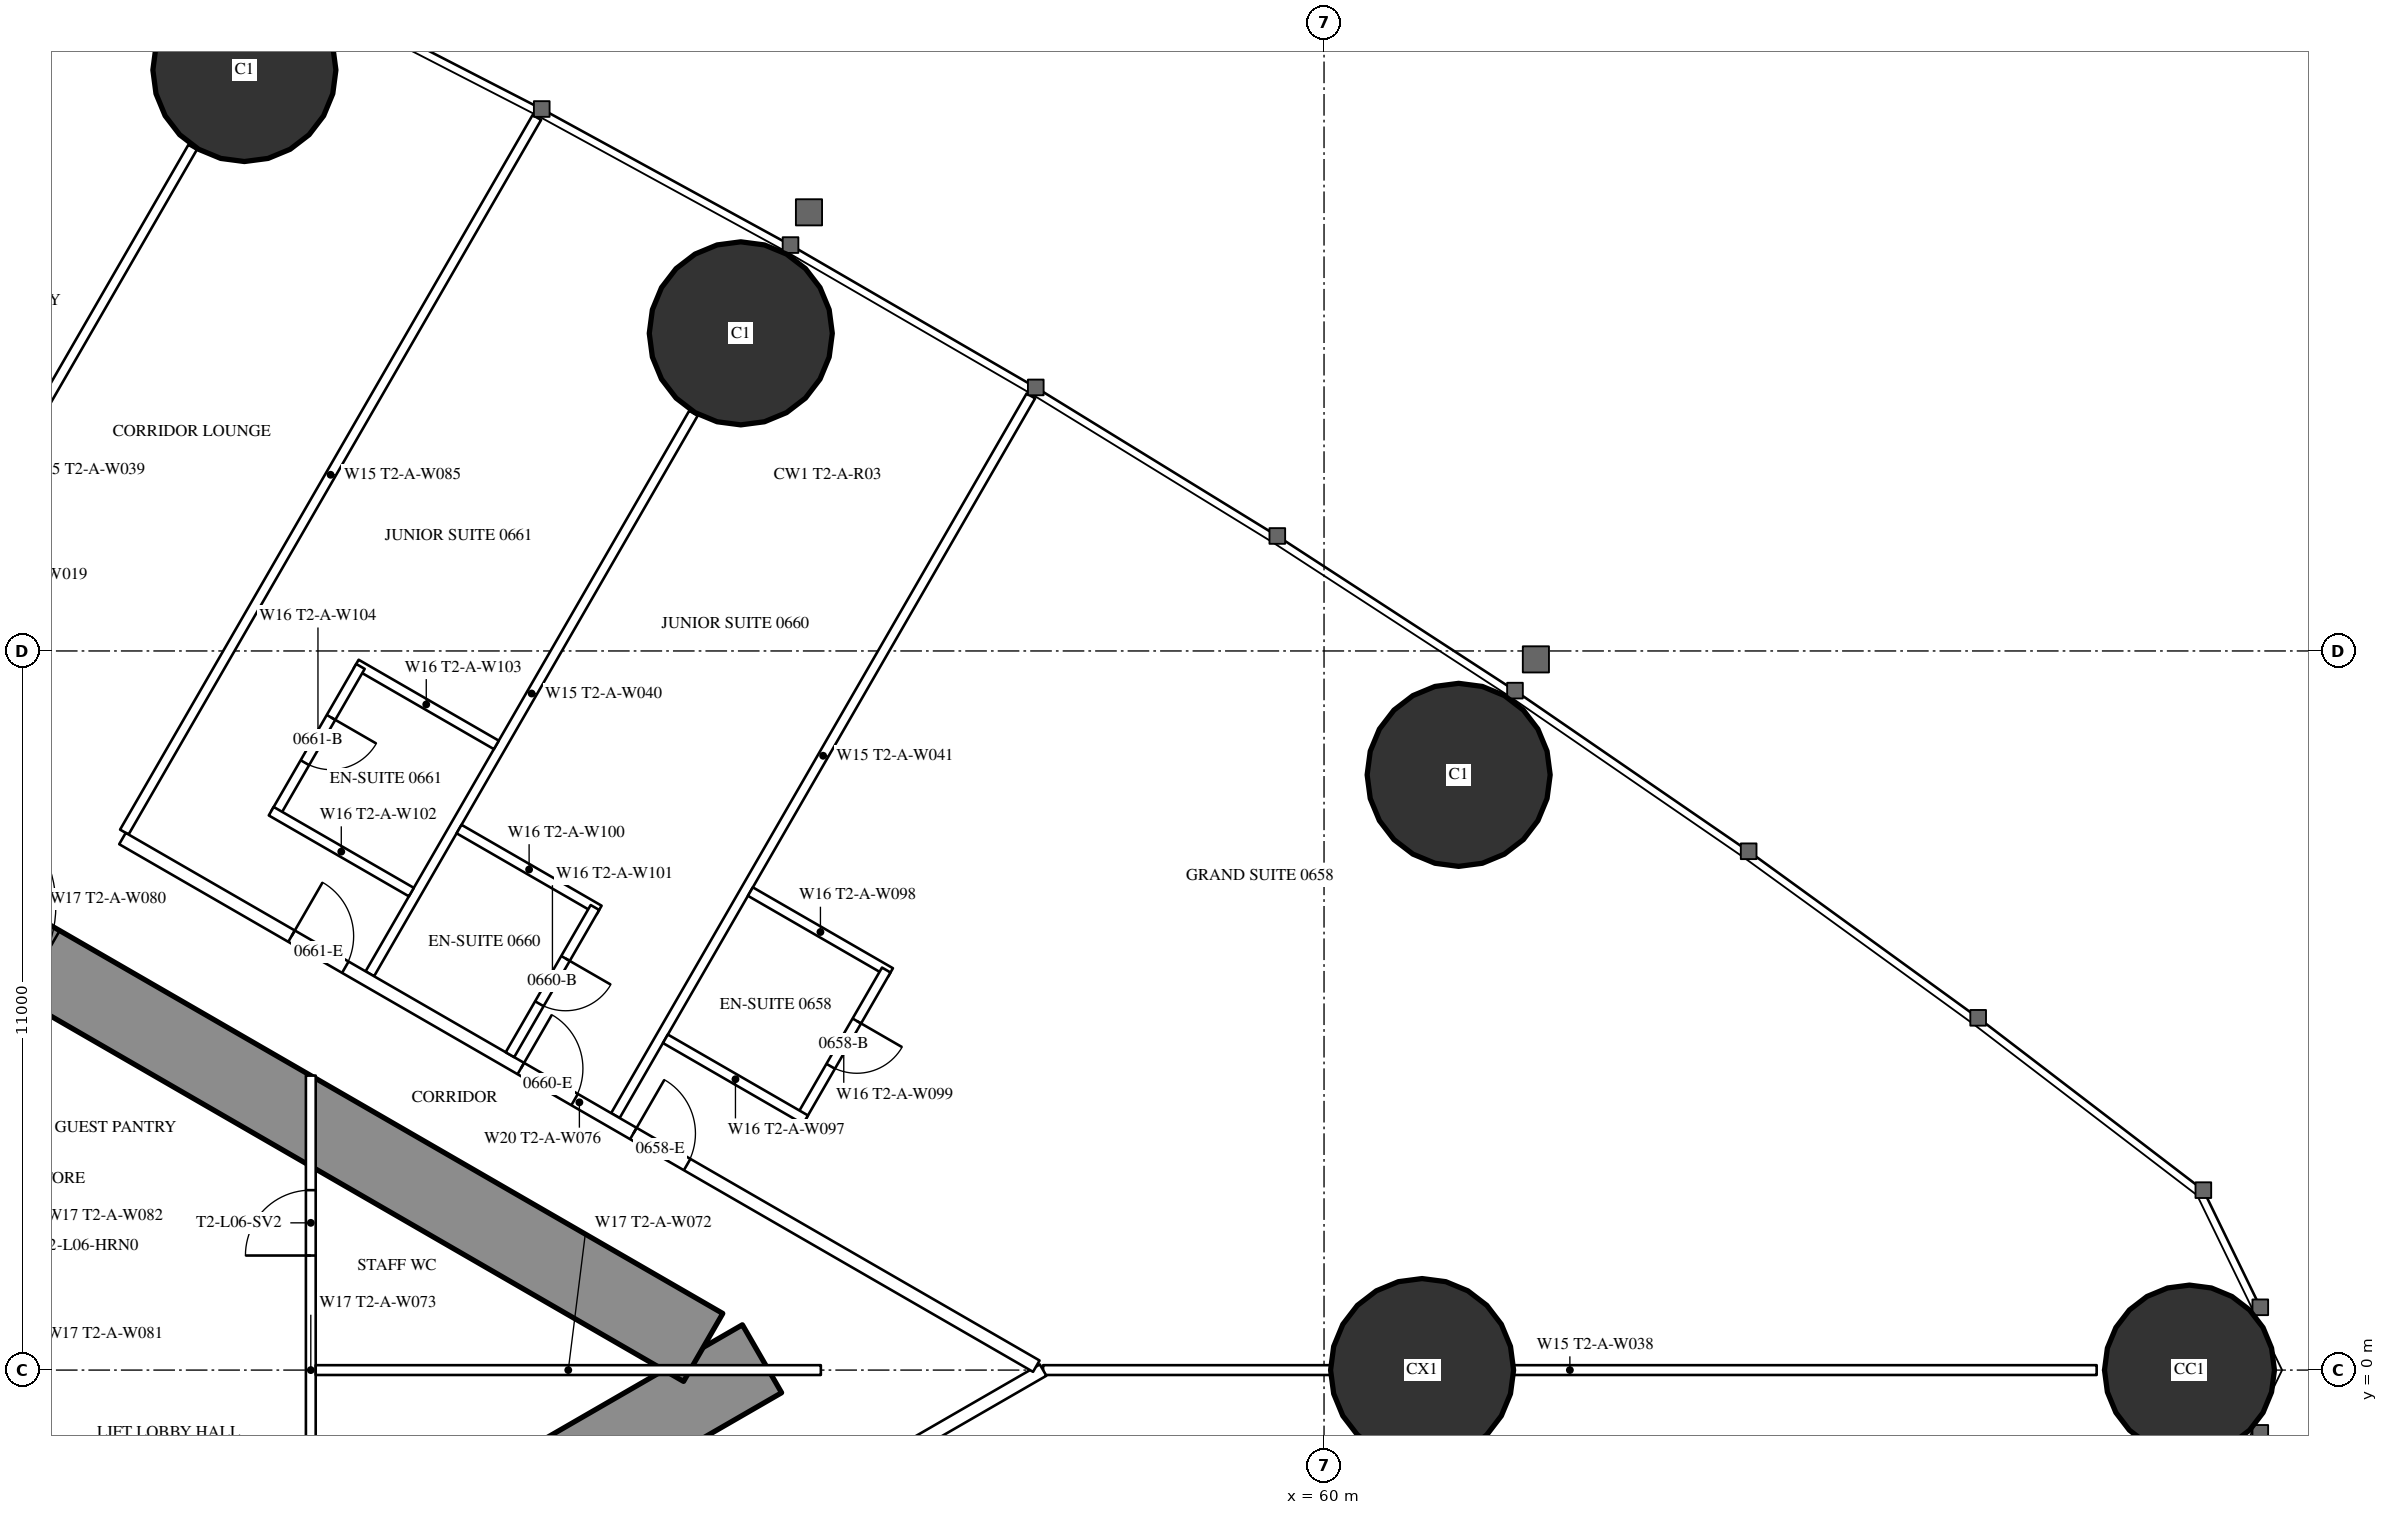
"""IFC4 building model, lengths in metres.
Left out: names, types, materials, properties, quantities, classifications, styles, units other than length and angle.
Written with IfcOpenShell. Run it as: python <this file> out.ifc"""

import sys

from ifc_helpers import new_model, si_unit, direction, frame, frame_2d, origin, origin_2d, place, context, subcontext, project, spatial, rectangle, hollow_circle, extrude, element, fill, save


model = new_model("IFC4")
c1 = context("Model", 3, precision=1e-05, world=origin(), true_north=direction((0.0, 1.0)))
c2 = subcontext(c1, "Body", "Model", "MODEL_VIEW")
j1 = project(units=[si_unit("LENGTHUNIT", "METRE"), si_unit("PLANEANGLEUNIT", "RADIAN")], contexts=[c1])
p1 = place(None, origin())
s1 = spatial("IfcSite", under=j1, at=p1, CompositionType="ELEMENT")
p2 = place(p1, origin())
s2 = spatial("IfcBuilding", under=s1, at=p2, CompositionType="ELEMENT")
p3 = place(p2, frame((0.0, 0.0, 28.5)))
s3 = spatial("IfcBuildingStorey", under=s2, at=p3, CompositionType="ELEMENT", Elevation=28.5)
p4 = place(p3, frame((73.239, 0.0, 0.0), z_axis=(0.0, 0.0, 1.0), x_axis=(1.0, 0.0, 0.0)))
e1 = element("IfcColumn", 1, at=p4, inside=s3, PredefinedType="COLUMN", context=c2, shape_type="SweptSolid", body=[
    extrude(hollow_circle(Radius=1.3, WallThickness=0.1, at=origin_2d()), origin(), (0.0, 0.0, 1.0), 3.5),
])
for number, where, z_axis, x_axis in (
    (2, (62.059, 9.105, 0.0), (0.0, 0.0, 1.0), (1.0, 0.0, 0.0)),
    (3, (51.078, 15.858, 0.0), (0.0, 0.0, 1.0), (1.0, 0.0, 0.0)),
    (4, (43.484, 19.886, 0.0), (0.0, 0.0, 1.0), (1.0, 0.0, 0.0)),
):
    element("IfcColumn", number, at=place(p3, frame(where, z_axis=z_axis, x_axis=x_axis)), inside=s3, PredefinedType="COLUMN", context=c2, shape_type="SweptSolid", body=[
        extrude(hollow_circle(Radius=1.4, WallThickness=0.12, at=origin_2d()), origin(), (0.0, 0.0, 1.0), 3.5),
    ])
p5 = place(p3, frame((61.5, 0.0, 0.0), z_axis=(0.0, 0.0, 1.0), x_axis=(1.0, 0.0, 0.0)))
e5 = element("IfcColumn", 5, at=p5, inside=s3, PredefinedType="COLUMN", context=c2, shape_type="SweptSolid", body=[
    extrude(hollow_circle(Radius=1.4, WallThickness=0.1, at=origin_2d()), origin(), (0.0, 0.0, 1.0), 3.5),
])
p6 = place(p3, frame((27.2, -13.8, 0.0), z_axis=(0.0, 0.0, 1.0), x_axis=(0.866027159892, 0.499996958321, 0.0)))
e6 = element("IfcWall", 6, at=p6, inside=s3, PredefinedType="SHEAR", context=c2, shape_type="SweptSolid", body=[
    extrude(rectangle(XDim=27.947, YDim=1.2, at=frame_2d((13.973, 0.0))), origin(), (0.0, 0.0, 1.0), 3.5),
])
p7 = place(p6, frame((4.6, 0.0, 0.0)))
e7 = element("IfcOpeningElement", 7, at=p7, cuts=e6, PredefinedType="OPENING", context=c2, shape_type="SweptSolid", body=[
    extrude(rectangle(XDim=1.0, YDim=2.2, at=frame_2d((0.5, 1.1))), frame((0.0, 0.61, 0.0), z_axis=(0.0, -1.0, 0.0), x_axis=(1.0, 0.0, 0.0)), (0.0, 0.0, 1.0), 1.22),
])
p8 = place(p6, frame((13.395, 0.0, 0.0)))
e8 = element("IfcOpeningElement", 8, at=p8, cuts=e6, PredefinedType="OPENING", context=c2, shape_type="SweptSolid", body=[
    extrude(rectangle(XDim=1.8, YDim=2.2, at=frame_2d((0.9, 1.1))), frame((0.0, 0.61, 0.0), z_axis=(0.0, -1.0, 0.0), x_axis=(1.0, 0.0, 0.0)), (0.0, 0.0, 1.0), 1.22),
])
p9 = place(p3, frame((27.2, 13.8, 0.0), z_axis=(0.0, 0.0, 1.0), x_axis=(0.866024515034, -0.500001539357, 0.0)))
e9 = element("IfcWall", 9, at=p9, inside=s3, PredefinedType="SHEAR", context=c2, shape_type="SweptSolid", body=[
    extrude(rectangle(XDim=26.907, YDim=1.2, at=frame_2d((13.454, 0.0))), origin(), (0.0, 0.0, 1.0), 3.5),
])
p10 = place(p9, frame((4.6, 0.0, 0.0)))
e10 = element("IfcOpeningElement", 10, at=p10, cuts=e9, PredefinedType="OPENING", context=c2, shape_type="SweptSolid", body=[
    extrude(rectangle(XDim=1.0, YDim=2.2, at=frame_2d((0.5, 1.1))), frame((0.0, 0.61, 0.0), z_axis=(0.0, -1.0, 0.0), x_axis=(1.0, 0.0, 0.0)), (0.0, 0.0, 1.0), 1.22),
])
p11 = place(p9, frame((13.395, 0.0, 0.0)))
e11 = element("IfcOpeningElement", 11, at=p11, cuts=e9, PredefinedType="OPENING", context=c2, shape_type="SweptSolid", body=[
    extrude(rectangle(XDim=1.8, YDim=2.2, at=frame_2d((0.9, 1.1))), frame((0.0, 0.61, 0.0), z_axis=(0.0, -1.0, 0.0), x_axis=(1.0, 0.0, 0.0)), (0.0, 0.0, 1.0), 1.22),
])
p12 = place(p3, frame((37.895, 10.396, 0.0), z_axis=(0.0, 0.0, 1.0), x_axis=(0.499995616528, 0.866027934568, 0.0)))
e12 = element("IfcWall", 12, at=p12, inside=s3, PredefinedType="PARTITIONING", context=c2, shape_type="SweptSolid", body=[
    extrude(rectangle(XDim=9.593, YDim=0.15, at=frame_2d((4.797, 0.0))), origin(), (0.0, 0.0, 1.0), 2.25),
])
p13 = place(p3, frame((41.647, 8.23, 0.0), z_axis=(0.0, 0.0, 1.0), x_axis=(0.49998590462, 0.866033541603, 0.0)))
e13 = element("IfcWall", 13, at=p13, inside=s3, PredefinedType="PARTITIONING", context=c2, shape_type="SweptSolid", body=[
    extrude(rectangle(XDim=12.621, YDim=0.15, at=frame_2d((6.311, 0.0))), origin(), (0.0, 0.0, 1.0), 3.25),
])
p14 = place(p3, frame((45.403, 6.062, 0.0), z_axis=(0.0, 0.0, 1.0), x_axis=(0.500013434677, 0.866017647131, 0.0)))
e14 = element("IfcWall", 14, at=p14, inside=s3, PredefinedType="PARTITIONING", context=c2, shape_type="SweptSolid", body=[
    extrude(rectangle(XDim=9.902, YDim=0.15, at=frame_2d((4.951, 0.0))), origin(), (0.0, 0.0, 1.0), 2.25),
])
p15 = place(p3, frame((49.159, 3.893, 0.0), z_axis=(0.0, 0.0, 1.0), x_axis=(0.499995664361, 0.866027906952, 0.0)))
e15 = element("IfcWall", 15, at=p15, inside=s3, PredefinedType="PARTITIONING", context=c2, shape_type="SweptSolid", body=[
    extrude(rectangle(XDim=12.711, YDim=0.15, at=frame_2d((6.356, 0.0))), origin(), (0.0, 0.0, 1.0), 3.25),
])
p16 = place(p3, frame((55.702, 0.0, 0.0), z_axis=(0.0, 0.0, 1.0), x_axis=(1.0, 0.0, 0.0)))
e16 = element("IfcWall", 16, at=p16, inside=s3, PredefinedType="PARTITIONING", context=c2, shape_type="SweptSolid", body=[
    extrude(rectangle(XDim=16.117, YDim=0.15, at=frame_2d((8.059, 0.0))), origin(), (0.0, 0.0, 1.0), 2.25),
])
p17 = place(p3, frame((37.96, -10.243, 0.0), z_axis=(0.0, 0.0, 1.0), x_axis=(0.866026429433, 0.499998223521, 0.0)))
e17 = element("IfcWall", 17, at=p17, inside=s3, PredefinedType="PARTITIONING", context=c2, shape_type="SweptSolid", body=[
    extrude(rectangle(XDim=20.487, YDim=0.2, at=frame_2d((10.243, 0.0))), origin(), (0.0, 0.0, 1.0), 3.25),
])
p18 = place(p17, frame((4.575, 0.0, 0.0)))
e18 = element("IfcOpeningElement", 18, at=p18, cuts=e17, PredefinedType="OPENING", context=c2, shape_type="SweptSolid", body=[
    extrude(rectangle(XDim=0.95, YDim=2.2, at=frame_2d((0.475, 1.1))), frame((0.0, 0.11, 0.0), z_axis=(0.0, -1.0, 0.0), x_axis=(1.0, 0.0, 0.0)), (0.0, 0.0, 1.0), 0.22),
])
p19 = place(p17, frame((9.199, 0.0, 0.0)))
e19 = element("IfcOpeningElement", 19, at=p19, cuts=e17, PredefinedType="OPENING", context=c2, shape_type="SweptSolid", body=[
    extrude(rectangle(XDim=0.95, YDim=2.2, at=frame_2d((0.475, 1.1))), frame((0.0, 0.11, 0.0), z_axis=(0.0, -1.0, 0.0), x_axis=(1.0, 0.0, 0.0)), (0.0, 0.0, 1.0), 0.22),
])
p20 = place(p17, frame((15.599, 0.0, 0.0)))
e20 = element("IfcOpeningElement", 20, at=p20, cuts=e17, PredefinedType="OPENING", context=c2, shape_type="SweptSolid", body=[
    extrude(rectangle(XDim=0.95, YDim=2.2, at=frame_2d((0.475, 1.1))), frame((0.0, 0.11, 0.0), z_axis=(0.0, -1.0, 0.0), x_axis=(1.0, 0.0, 0.0)), (0.0, 0.0, 1.0), 0.22),
])
p21 = place(p17, frame((2.875, 0.0, 0.0)))
e21 = element("IfcOpeningElement", 21, at=p21, cuts=e17, PredefinedType="OPENING", context=c2, shape_type="SweptSolid", body=[
    extrude(rectangle(XDim=0.95, YDim=2.2, at=frame_2d((0.475, 1.1))), frame((0.0, 0.11, 0.0), z_axis=(0.0, -1.0, 0.0), x_axis=(1.0, 0.0, 0.0)), (0.0, 0.0, 1.0), 0.22),
])
p22 = place(p3, frame((41.619, 8.131, 0.0), z_axis=(0.0, 0.0, 1.0), x_axis=(0.86603245327, -0.499987789734, 0.0)))
e22 = element("IfcWall", 22, at=p22, inside=s3, PredefinedType="PARTITIONING", context=c2, shape_type="SweptSolid", body=[
    extrude(rectangle(XDim=16.142, YDim=0.2, at=frame_2d((8.071, 0.0))), origin(), (0.0, 0.0, 1.0), 3.25),
])
p23 = place(p22, frame((9.024, 0.0, 0.0)))
e23 = element("IfcOpeningElement", 23, at=p23, cuts=e22, PredefinedType="OPENING", context=c2, shape_type="SweptSolid", body=[
    extrude(rectangle(XDim=0.95, YDim=2.2, at=frame_2d((0.475, 1.1))), frame((0.0, 0.11, 0.0), z_axis=(0.0, -1.0, 0.0), x_axis=(1.0, 0.0, 0.0)), (0.0, 0.0, 1.0), 0.22),
])
p24 = place(p22, frame((7.037, 0.0, 0.0)))
e24 = element("IfcOpeningElement", 24, at=p24, cuts=e22, PredefinedType="OPENING", context=c2, shape_type="SweptSolid", body=[
    extrude(rectangle(XDim=0.95, YDim=2.2, at=frame_2d((0.475, 1.1))), frame((0.0, 0.11, 0.0), z_axis=(0.0, -1.0, 0.0), x_axis=(1.0, 0.0, 0.0)), (0.0, 0.0, 1.0), 0.22),
])
p25 = place(p22, frame((2.987, 0.0, 0.0)))
e25 = element("IfcOpeningElement", 25, at=p25, cuts=e22, PredefinedType="OPENING", context=c2, shape_type="SweptSolid", body=[
    extrude(rectangle(XDim=0.95, YDim=2.2, at=frame_2d((0.475, 1.1))), frame((0.0, 0.11, 0.0), z_axis=(0.0, -1.0, 0.0), x_axis=(1.0, 0.0, 0.0)), (0.0, 0.0, 1.0), 0.22),
])
p26 = place(p3, frame((51.224, 7.32, 0.0), z_axis=(0.0, 0.0, 1.0), x_axis=(0.866031185235, -0.4999899861, 0.0)))
e26 = element("IfcWall", 26, at=p26, inside=s3, PredefinedType="PARTITIONING", context=c2, shape_type="SweptSolid", body=[
    extrude(rectangle(XDim=2.475, YDim=0.15, at=frame_2d((1.238, 0.0))), origin(), (0.0, 0.0, 1.0), 3.25),
])
p27 = place(p3, frame((52.003, 3.868, 0.0), z_axis=(0.0, 0.0, 1.0), x_axis=(0.500047596559, 0.865997922154, 0.0)))
e27 = element("IfcWall", 27, at=p27, inside=s3, PredefinedType="PARTITIONING", context=c2, shape_type="SweptSolid", body=[
    extrude(rectangle(XDim=2.6, YDim=0.15, at=frame_2d((1.3, 0.0))), origin(), (0.0, 0.0, 1.0), 3.25),
])
p28 = place(p27, frame((0.9, 0.0, 0.0)))
e28 = element("IfcOpeningElement", 28, at=p28, cuts=e27, PredefinedType="OPENING", context=c2, shape_type="SweptSolid", body=[
    extrude(rectangle(XDim=0.8, YDim=2.2, at=frame_2d((0.4, 1.1))), frame((0.0, 0.085, 0.0), z_axis=(0.0, -1.0, 0.0), x_axis=(1.0, 0.0, 0.0)), (0.0, 0.0, 1.0), 0.17),
])
p29 = place(p3, frame((49.925, 5.068, 0.0), z_axis=(0.0, 0.0, 1.0), x_axis=(0.866006523861, -0.500032699561, 0.0)))
e29 = element("IfcWall", 29, at=p29, inside=s3, PredefinedType="PARTITIONING", context=c2, shape_type="SweptSolid", body=[
    extrude(rectangle(XDim=2.475, YDim=0.15, at=frame_2d((1.237, 0.0))), origin(), (0.0, 0.0, 1.0), 3.25),
])
p30 = place(p3, frame((46.768, 8.276, 0.0), z_axis=(0.0, 0.0, 1.0), x_axis=(0.866031185235, -0.4999899861, 0.0)))
e30 = element("IfcWall", 30, at=p30, inside=s3, PredefinedType="PARTITIONING", context=c2, shape_type="SweptSolid", body=[
    extrude(rectangle(XDim=2.475, YDim=0.15, at=frame_2d((1.238, 0.0))), origin(), (0.0, 0.0, 1.0), 3.25),
])
p31 = place(p3, frame((47.546, 4.824, 0.0), z_axis=(0.0, 0.0, 1.0), x_axis=(0.500006934395, 0.866021400173, 0.0)))
e31 = element("IfcWall", 31, at=p31, inside=s3, PredefinedType="PARTITIONING", context=c2, shape_type="SweptSolid", body=[
    extrude(rectangle(XDim=2.6, YDim=0.15, at=frame_2d((1.3, 0.0))), origin(), (0.0, 0.0, 1.0), 3.25),
])
p32 = place(p31, frame((0.9, 0.0, 0.0)))
e32 = element("IfcOpeningElement", 32, at=p32, cuts=e31, PredefinedType="OPENING", context=c2, shape_type="SweptSolid", body=[
    extrude(rectangle(XDim=0.8, YDim=2.2, at=frame_2d((0.4, 1.1))), frame((0.0, 0.085, 0.0), z_axis=(0.0, -1.0, 0.0), x_axis=(1.0, 0.0, 0.0)), (0.0, 0.0, 1.0), 0.17),
])
p33 = place(p3, frame((45.195, 10.801, 0.0), z_axis=(0.0, 0.0, 1.0), x_axis=(0.86604923931, -0.499958713387, 0.0)))
e33 = element("IfcWall", 33, at=p33, inside=s3, PredefinedType="PARTITIONING", context=c2, shape_type="SweptSolid", body=[
    extrude(rectangle(XDim=2.475, YDim=0.15, at=frame_2d((1.237, 0.0))), origin(), (0.0, 0.0, 1.0), 3.25),
])
p34 = place(p3, frame((43.959, 8.512, 0.0), z_axis=(0.0, 0.0, 1.0), x_axis=(0.500006934395, 0.866021400173, 0.0)))
e34 = element("IfcWall", 34, at=p34, inside=s3, PredefinedType="PARTITIONING", context=c2, shape_type="SweptSolid", body=[
    extrude(rectangle(XDim=2.6, YDim=0.15, at=frame_2d((1.3, 0.0))), origin(), (0.0, 0.0, 1.0), 3.25),
])
p35 = place(p34, frame((0.9, 0.0, 0.0)))
e35 = element("IfcOpeningElement", 35, at=p35, cuts=e34, PredefinedType="OPENING", context=c2, shape_type="SweptSolid", body=[
    extrude(rectangle(XDim=0.8, YDim=2.2, at=frame_2d((0.4, 1.1))), frame((0.0, 0.085, 0.0), z_axis=(0.0, -1.0, 0.0), x_axis=(1.0, 0.0, 0.0)), (0.0, 0.0, 1.0), 0.17),
])
p36 = place(p3, frame((43.895, 8.549, 0.0), z_axis=(0.0, 0.0, 1.0), x_axis=(0.866031185235, -0.4999899861, 0.0)))
e36 = element("IfcWall", 36, at=p36, inside=s3, PredefinedType="PARTITIONING", context=c2, shape_type="SweptSolid", body=[
    extrude(rectangle(XDim=2.475, YDim=0.15, at=frame_2d((1.238, 0.0))), origin(), (0.0, 0.0, 1.0), 3.25),
])
p37 = place(p3, frame((44.5, -4.505, 0.0), z_axis=(0.0, 0.0, 1.0), x_axis=(0.0, 1.0, 0.0)))
e37 = element("IfcWall", 37, at=p37, inside=s3, PredefinedType="PARTITIONING", context=c2, shape_type="SweptSolid", body=[
    extrude(rectangle(XDim=9.009, YDim=0.15, at=frame_2d((4.505, 0.0))), origin(), (0.0, 0.0, 1.0), 2.45),
])
p38 = place(p37, frame((1.752, 0.0, 0.0)))
e38 = element("IfcOpeningElement", 38, at=p38, cuts=e37, PredefinedType="OPENING", context=c2, shape_type="SweptSolid", body=[
    extrude(rectangle(XDim=1.0, YDim=2.2, at=frame_2d((0.5, 1.1))), frame((0.0, 0.085, 0.0), z_axis=(0.0, -1.0, 0.0), x_axis=(1.0, 0.0, 0.0)), (0.0, 0.0, 1.0), 0.17),
])
p39 = place(p37, frame((6.257, 0.0, 0.0)))
e39 = element("IfcOpeningElement", 39, at=p39, cuts=e37, PredefinedType="OPENING", context=c2, shape_type="SweptSolid", body=[
    extrude(rectangle(XDim=1.0, YDim=2.2, at=frame_2d((0.5, 1.1))), frame((0.0, 0.085, 0.0), z_axis=(0.0, -1.0, 0.0), x_axis=(1.0, 0.0, 0.0)), (0.0, 0.0, 1.0), 0.17),
])
p40 = place(p3, frame((44.575, 0.0, 0.0), z_axis=(0.0, 0.0, 1.0), x_axis=(1.0, 0.0, 0.0)))
e40 = element("IfcWall", 40, at=p40, inside=s3, PredefinedType="PARTITIONING", context=c2, shape_type="SweptSolid", body=[
    extrude(rectangle(XDim=7.727, YDim=0.15, at=frame_2d((3.864, 0.0))), origin(), (0.0, 0.0, 1.0), 2.25),
])
p41 = place(p28, origin())
e41 = element("IfcDoor", 41, at=p41, inside=s3, OperationType="SINGLE_SWING_RIGHT", PredefinedType="DOOR", context=c2, shape_type="SweptSolid", body=[
    extrude(rectangle(XDim=0.8, YDim=2.2, at=frame_2d((0.4, 1.1))), frame((0.0, 0.025, 0.0), z_axis=(0.0, -1.0, 0.0), x_axis=(1.0, 0.0, 0.0)), (0.0, 0.0, 1.0), 0.05),
])
fill(e28, e41)
p42 = place(p23, origin())
e42 = element("IfcDoor", 42, at=p42, inside=s3, OperationType="SINGLE_SWING_LEFT", PredefinedType="DOOR", context=c2, shape_type="SweptSolid", body=[
    extrude(rectangle(XDim=0.95, YDim=2.2, at=frame_2d((0.475, 1.1))), frame((0.0, 0.025, 0.0), z_axis=(0.0, -1.0, 0.0), x_axis=(1.0, 0.0, 0.0)), (0.0, 0.0, 1.0), 0.05),
])
fill(e23, e42)
p43 = place(p32, origin())
e43 = element("IfcDoor", 43, at=p43, inside=s3, OperationType="SINGLE_SWING_RIGHT", PredefinedType="DOOR", context=c2, shape_type="SweptSolid", body=[
    extrude(rectangle(XDim=0.8, YDim=2.2, at=frame_2d((0.4, 1.1))), frame((0.0, 0.025, 0.0), z_axis=(0.0, -1.0, 0.0), x_axis=(1.0, 0.0, 0.0)), (0.0, 0.0, 1.0), 0.05),
])
fill(e32, e43)
p44 = place(p24, origin())
e44 = element("IfcDoor", 44, at=p44, inside=s3, OperationType="SINGLE_SWING_LEFT", PredefinedType="DOOR", context=c2, shape_type="SweptSolid", body=[
    extrude(rectangle(XDim=0.95, YDim=2.2, at=frame_2d((0.475, 1.1))), frame((0.0, 0.025, 0.0), z_axis=(0.0, -1.0, 0.0), x_axis=(1.0, 0.0, 0.0)), (0.0, 0.0, 1.0), 0.05),
])
fill(e24, e44)
p45 = place(p35, origin())
e45 = element("IfcDoor", 45, at=p45, inside=s3, OperationType="SINGLE_SWING_RIGHT", PredefinedType="DOOR", context=c2, shape_type="SweptSolid", body=[
    extrude(rectangle(XDim=0.8, YDim=2.2, at=frame_2d((0.4, 1.1))), frame((0.0, 0.025, 0.0), z_axis=(0.0, -1.0, 0.0), x_axis=(1.0, 0.0, 0.0)), (0.0, 0.0, 1.0), 0.05),
])
fill(e35, e45)
p46 = place(p25, origin())
e46 = element("IfcDoor", 46, at=p46, inside=s3, OperationType="SINGLE_SWING_LEFT", PredefinedType="DOOR", context=c2, shape_type="SweptSolid", body=[
    extrude(rectangle(XDim=0.95, YDim=2.2, at=frame_2d((0.475, 1.1))), frame((0.0, 0.025, 0.0), z_axis=(0.0, -1.0, 0.0), x_axis=(1.0, 0.0, 0.0)), (0.0, 0.0, 1.0), 0.05),
])
fill(e25, e46)
p47 = place(p39, origin())
e47 = element("IfcDoor", 47, at=p47, inside=s3, OperationType="SINGLE_SWING_LEFT", PredefinedType="DOOR", context=c2, shape_type="SweptSolid", body=[
    extrude(rectangle(XDim=1.0, YDim=2.2, at=frame_2d((0.5, 1.1))), frame((0.0, 0.025, 0.0), z_axis=(0.0, -1.0, 0.0), x_axis=(1.0, 0.0, 0.0)), (0.0, 0.0, 1.0), 0.05),
])
fill(e39, e47)
save(model, sys.argv[1])
